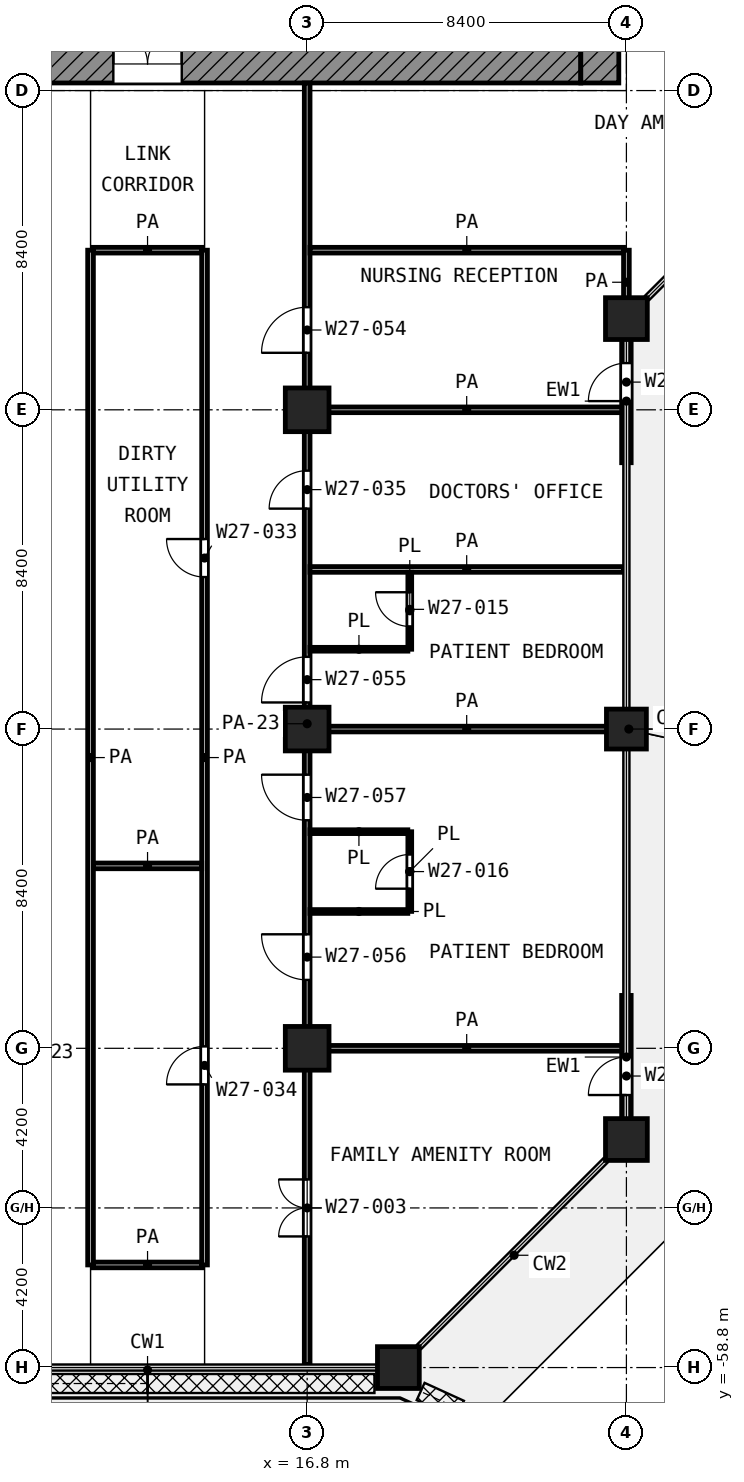
"""IFC4 building model, lengths in metres.
Left out: names, types, materials, properties, quantities, classifications, styles, units other than length and angle.
Written with IfcOpenShell. Run it as: python <this file> out.ifc"""

import sys

from ifc_helpers import new_model, si_unit, direction, frame, frame_2d, origin, origin_2d, place, context, subcontext, project, spatial, rectangle, extrude, element, fill, save


model = new_model("IFC4")
c1 = context("Model", 3, precision=1e-05, world=origin(), true_north=direction((0.0, 1.0)))
c2 = subcontext(c1, "Body", "Model", "MODEL_VIEW")
j1 = project(units=[si_unit("LENGTHUNIT", "METRE"), si_unit("PLANEANGLEUNIT", "RADIAN")], contexts=[c1])
p1 = place(None, origin())
s1 = spatial("IfcSite", under=j1, at=p1, CompositionType="ELEMENT")
p2 = place(p1, origin())
s2 = spatial("IfcBuilding", under=s1, at=p2, CompositionType="ELEMENT")
p3 = place(p2, frame((0.0, 0.0, 140.8)))
s3 = spatial("IfcBuildingStorey", under=s2, at=p3, CompositionType="ELEMENT", Elevation=140.8)
p4 = place(p3, frame((25.2, -31.2, 0.0), z_axis=(0.0, 0.0, 1.0), x_axis=(1.0, 0.0, 0.0)))
e1 = element("IfcColumn", 1, at=p4, inside=s3, PredefinedType="COLUMN", context=c2, shape_type="SweptSolid", body=[
    extrude(rectangle(XDim=1.1, YDim=1.1, at=origin_2d()), origin(), (0.0, 0.0, 1.0), 4.2),
])
for number, where, z_axis, x_axis in (
    (2, (16.8, -33.6, 0.0), (0.0, 0.0, 1.0), (1.0, 0.0, 0.0)),
    (3, (16.8, -42.0, 0.0), (0.0, 0.0, 1.0), (1.0, 0.0, 0.0)),
):
    element("IfcColumn", number, at=place(p3, frame(where, z_axis=z_axis, x_axis=x_axis)), inside=s3, PredefinedType="COLUMN", context=c2, shape_type="SweptSolid", body=[
        extrude(rectangle(XDim=1.15, YDim=1.15, at=origin_2d()), origin(), (0.0, 0.0, 1.0), 4.2),
    ])
p5 = place(p3, frame((25.2, -42.0, 0.0), z_axis=(0.0, 0.0, 1.0), x_axis=(1.0, 0.0, 0.0)))
e4 = element("IfcColumn", 4, at=p5, inside=s3, PredefinedType="COLUMN", context=c2, shape_type="SweptSolid", body=[
    extrude(rectangle(XDim=1.05, YDim=1.05, at=origin_2d()), origin(), (0.0, 0.0, 1.0), 4.2),
])
p6 = place(p3, frame((16.8, -50.4, 0.0), z_axis=(0.0, 0.0, 1.0), x_axis=(1.0, 0.0, 0.0)))
e5 = element("IfcColumn", 5, at=p6, inside=s3, PredefinedType="COLUMN", context=c2, shape_type="SweptSolid", body=[
    extrude(rectangle(XDim=1.15, YDim=1.15, at=origin_2d()), origin(), (0.0, 0.0, 1.0), 4.2),
])
for number, where, z_axis, x_axis in (
    (6, (25.2, -52.8, 0.0), (0.0, 0.0, 1.0), (1.0, 0.0, 0.0)),
    (7, (19.2, -58.8, 0.0), (0.0, 0.0, 1.0), (1.0, 0.0, 0.0)),
):
    element("IfcColumn", number, at=place(p3, frame(where, z_axis=z_axis, x_axis=x_axis)), inside=s3, PredefinedType="COLUMN", context=c2, shape_type="SweptSolid", body=[
        extrude(rectangle(XDim=1.1, YDim=1.1, at=origin_2d()), origin(), (0.0, 0.0, 1.0), 4.2),
    ])
p7 = place(p3, frame((25.2, -52.25, 0.0), z_axis=(0.0, 0.0, 1.0), x_axis=(0.0, 1.0, 0.0)))
e8 = element("IfcWall", 8, at=p7, inside=s3, PredefinedType="SOLIDWALL", context=c2, shape_type="SweptSolid", body=[
    extrude(rectangle(XDim=3.242, YDim=0.25, at=frame_2d((1.621, 0.0))), origin(), (0.0, 0.0, 1.0), 3.48),
])
p8 = place(p7, frame((0.621, 0.0, 0.0)))
e9 = element("IfcOpeningElement", 9, at=p8, cuts=e8, PredefinedType="OPENING", context=c2, shape_type="SweptSolid", body=[
    extrude(rectangle(XDim=1.0, YDim=2.1, at=frame_2d((0.5, 1.05))), frame((0.0, 0.135, 0.0), z_axis=(0.0, -1.0, 0.0), x_axis=(1.0, 0.0, 0.0)), (0.0, 0.0, 1.0), 0.27),
])
p9 = place(p3, frame((25.2, -34.992, 0.0), z_axis=(0.0, 0.0, 1.0), x_axis=(0.0, 1.0, 0.0)))
e10 = element("IfcWall", 10, at=p9, inside=s3, PredefinedType="SOLIDWALL", context=c2, shape_type="SweptSolid", body=[
    extrude(rectangle(XDim=3.242, YDim=0.25, at=frame_2d((1.621, 0.0))), origin(), (0.0, 0.0, 1.0), 3.48),
])
p10 = place(p9, frame((1.621, 0.0, 0.0)))
e11 = element("IfcOpeningElement", 11, at=p10, cuts=e10, PredefinedType="OPENING", context=c2, shape_type="SweptSolid", body=[
    extrude(rectangle(XDim=1.0, YDim=2.1, at=frame_2d((0.5, 1.05))), frame((0.0, 0.135, 0.0), z_axis=(0.0, -1.0, 0.0), x_axis=(1.0, 0.0, 0.0)), (0.0, 0.0, 1.0), 0.27),
])
p11 = place(p3, frame((5.4, -24.5, 0.0), z_axis=(0.0, 0.0, 1.0), x_axis=(1.0, 0.0, 0.0)))
e12 = element("IfcWall", 12, at=p11, inside=s3, PredefinedType="SHEAR", context=c2, shape_type="SweptSolid", body=[
    extrude(rectangle(XDim=18.6, YDim=1.0, at=frame_2d((9.3, 0.0))), origin(), (0.0, 0.0, 1.0), 3.6),
])
p12 = place(p11, frame((6.3, 0.0, 0.0)))
e13 = element("IfcOpeningElement", 13, at=p12, cuts=e12, PredefinedType="OPENING", context=c2, shape_type="SweptSolid", body=[
    extrude(rectangle(XDim=1.8, YDim=2.1, at=frame_2d((0.9, 1.05))), frame((0.0, 0.51, 0.0), z_axis=(0.0, -1.0, 0.0), x_axis=(1.0, 0.0, 0.0)), (0.0, 0.0, 1.0), 1.02),
])
p13 = place(p3, frame((24.5, -25.0, 0.0), z_axis=(0.0, 0.0, 1.0), x_axis=(0.0, 1.0, 0.0)))
e14 = element("IfcWall", 14, at=p13, inside=s3, PredefinedType="SHEAR", context=c2, shape_type="SweptSolid", body=[
    extrude(rectangle(XDim=1.0, YDim=1.0, at=frame_2d((0.5, 0.0))), origin(), (0.0, 0.0, 1.0), 3.6),
])
p14 = place(p3, frame((16.875, -46.8, 0.0), z_axis=(0.0, 0.0, 1.0), x_axis=(1.0, 0.0, 0.0)))
e15 = element("IfcWall", 15, at=p14, inside=s3, PredefinedType="PARTITIONING", context=c2, shape_type="SweptSolid", body=[
    extrude(rectangle(XDim=2.573, YDim=0.1, at=frame_2d((1.287, 0.0))), origin(), (0.0, 0.0, 1.0), 3.6),
])
p15 = place(p3, frame((16.875, -44.7, 0.0), z_axis=(0.0, 0.0, 1.0), x_axis=(1.0, 0.0, 0.0)))
e16 = element("IfcWall", 16, at=p15, inside=s3, PredefinedType="PARTITIONING", context=c2, shape_type="SweptSolid", body=[
    extrude(rectangle(XDim=2.574, YDim=0.1, at=frame_2d((1.287, 0.0))), origin(), (0.0, 0.0, 1.0), 3.6),
])
p16 = place(p3, frame((16.875, -39.9, 0.0), z_axis=(0.0, 0.0, 1.0), x_axis=(1.0, 0.0, 0.0)))
e17 = element("IfcWall", 17, at=p16, inside=s3, PredefinedType="PARTITIONING", context=c2, shape_type="SweptSolid", body=[
    extrude(rectangle(XDim=2.575, YDim=0.1, at=frame_2d((1.288, 0.0))), origin(), (0.0, 0.0, 1.0), 3.6),
])
p17 = place(p3, frame((19.5, -46.798, 0.0), z_axis=(0.0, 0.0, 1.0), x_axis=(0.0, 1.0, 0.0)))
e18 = element("IfcWall", 18, at=p17, inside=s3, PredefinedType="PARTITIONING", context=c2, shape_type="SweptSolid", body=[
    extrude(rectangle(XDim=2.096, YDim=0.1, at=frame_2d((1.048, 0.0))), origin(), (0.0, 0.0, 1.0), 3.6),
])
p18 = place(p17, frame((0.598, 0.0, 0.0)))
e19 = element("IfcOpeningElement", 19, at=p18, cuts=e18, PredefinedType="OPENING", context=c2, shape_type="SweptSolid", body=[
    extrude(rectangle(XDim=0.9, YDim=2.1, at=frame_2d((0.45, 1.05))), frame((0.0, 0.06, 0.0), z_axis=(0.0, -1.0, 0.0), x_axis=(1.0, 0.0, 0.0)), (0.0, 0.0, 1.0), 0.12),
])
p19 = place(p3, frame((19.5, -39.9, 0.0), z_axis=(0.0, 0.0, 1.0), x_axis=(0.0, 1.0, 0.0)))
e20 = element("IfcWall", 20, at=p19, inside=s3, PredefinedType="PARTITIONING", context=c2, shape_type="SweptSolid", body=[
    extrude(rectangle(XDim=2.025, YDim=0.1, at=frame_2d((1.012, 0.0))), origin(), (0.0, 0.0, 1.0), 3.6),
])
p20 = place(p19, frame((0.6, 0.0, 0.0)))
e21 = element("IfcOpeningElement", 21, at=p20, cuts=e20, PredefinedType="OPENING", context=c2, shape_type="SweptSolid", body=[
    extrude(rectangle(XDim=0.9, YDim=2.1, at=frame_2d((0.45, 1.05))), frame((0.0, 0.06, 0.0), z_axis=(0.0, -1.0, 0.0), x_axis=(1.0, 0.0, 0.0)), (0.0, 0.0, 1.0), 0.12),
])
p21 = place(p3, frame((11.175, -56.1, 0.0), z_axis=(0.0, 0.0, 1.0), x_axis=(1.0, 0.0, 0.0)))
e22 = element("IfcWall", 22, at=p21, inside=s3, PredefinedType="PARTITIONING", context=c2, shape_type="SweptSolid", body=[
    extrude(rectangle(XDim=2.85, YDim=0.15, at=frame_2d((1.425, 0.0))), origin(), (0.0, 0.0, 1.0), 3.6),
])
p22 = place(p3, frame((16.875, -50.4, 0.0), z_axis=(0.0, 0.0, 1.0), x_axis=(1.0, 0.0, 0.0)))
e23 = element("IfcWall", 23, at=p22, inside=s3, PredefinedType="PARTITIONING", context=c2, shape_type="SweptSolid", body=[
    extrude(rectangle(XDim=8.245, YDim=0.15, at=frame_2d((4.123, 0.0))), origin(), (0.0, 0.0, 1.0), 3.6),
])
p23 = place(p3, frame((11.175, -45.6, 0.0), z_axis=(0.0, 0.0, 1.0), x_axis=(1.0, 0.0, 0.0)))
e24 = element("IfcWall", 24, at=p23, inside=s3, PredefinedType="PARTITIONING", context=c2, shape_type="SweptSolid", body=[
    extrude(rectangle(XDim=2.85, YDim=0.15, at=frame_2d((1.425, 0.0))), origin(), (0.0, 0.0, 1.0), 3.6),
])
for number, where, z_axis, x_axis in (
    (25, (16.875, -42.0, 0.0), (0.0, 0.0, 1.0), (1.0, 0.0, 0.0)),
    (26, (16.875, -37.8, 0.0), (0.0, 0.0, 1.0), (1.0, 0.0, 0.0)),
    (27, (16.875, -33.6, 0.0), (0.0, 0.0, 1.0), (1.0, 0.0, 0.0)),
):
    element("IfcWall", number, at=place(p3, frame(where, z_axis=z_axis, x_axis=x_axis)), inside=s3, PredefinedType="PARTITIONING", context=c2, shape_type="SweptSolid", body=[
        extrude(rectangle(XDim=8.245, YDim=0.15, at=frame_2d((4.123, 0.0))), origin(), (0.0, 0.0, 1.0), 3.6),
    ])
p24 = place(p3, frame((11.175, -29.4, 0.0), z_axis=(0.0, 0.0, 1.0), x_axis=(1.0, 0.0, 0.0)))
e28 = element("IfcWall", 28, at=p24, inside=s3, PredefinedType="PARTITIONING", context=c2, shape_type="SweptSolid", body=[
    extrude(rectangle(XDim=2.85, YDim=0.15, at=frame_2d((1.425, 0.0))), origin(), (0.0, 0.0, 1.0), 3.6),
])
p25 = place(p3, frame((16.875, -29.4, 0.0), z_axis=(0.0, 0.0, 1.0), x_axis=(1.0, 0.0, 0.0)))
e29 = element("IfcWall", 29, at=p25, inside=s3, PredefinedType="PARTITIONING", context=c2, shape_type="SweptSolid", body=[
    extrude(rectangle(XDim=8.25, YDim=0.15, at=frame_2d((4.125, 0.0))), origin(), (0.0, 0.0, 1.0), 3.6),
])
p26 = place(p3, frame((11.1, -56.1, 0.0), z_axis=(0.0, 0.0, 1.0), x_axis=(0.0, 1.0, 0.0)))
e30 = element("IfcWall", 30, at=p26, inside=s3, PredefinedType="PARTITIONING", context=c2, shape_type="SweptSolid", body=[
    extrude(rectangle(XDim=26.7, YDim=0.15, at=frame_2d((13.35, 0.0))), origin(), (0.0, 0.0, 1.0), 3.6),
])
p27 = place(p3, frame((14.1, -56.1, 0.0), z_axis=(0.0, 0.0, 1.0), x_axis=(0.0, 1.0, 0.0)))
e31 = element("IfcWall", 31, at=p27, inside=s3, PredefinedType="PARTITIONING", context=c2, shape_type="SweptSolid", body=[
    extrude(rectangle(XDim=26.7, YDim=0.15, at=frame_2d((13.35, 0.0))), origin(), (0.0, 0.0, 1.0), 3.6),
])
p28 = place(p27, frame((18.1, 0.0, 0.0)))
e32 = element("IfcOpeningElement", 32, at=p28, cuts=e31, PredefinedType="OPENING", context=c2, shape_type="SweptSolid", body=[
    extrude(rectangle(XDim=1.0, YDim=2.1, at=frame_2d((0.5, 1.05))), frame((0.0, 0.085, 0.0), z_axis=(0.0, -1.0, 0.0), x_axis=(1.0, 0.0, 0.0)), (0.0, 0.0, 1.0), 0.17),
])
p29 = place(p27, frame((4.75, 0.0, 0.0)))
e33 = element("IfcOpeningElement", 33, at=p29, cuts=e31, PredefinedType="OPENING", context=c2, shape_type="SweptSolid", body=[
    extrude(rectangle(XDim=1.0, YDim=2.1, at=frame_2d((0.5, 1.05))), frame((0.0, 0.085, 0.0), z_axis=(0.0, -1.0, 0.0), x_axis=(1.0, 0.0, 0.0)), (0.0, 0.0, 1.0), 0.17),
])
p30 = place(p3, frame((16.8, -58.72, 0.0), z_axis=(0.0, 0.0, 1.0), x_axis=(0.0, 1.0, 0.0)))
e34 = element("IfcWall", 34, at=p30, inside=s3, PredefinedType="PARTITIONING", context=c2, shape_type="SweptSolid", body=[
    extrude(rectangle(XDim=33.72, YDim=0.15, at=frame_2d((16.86, 0.0))), origin(), (0.0, 0.0, 1.0), 2.7),
])
p31 = place(p30, frame((26.62, 0.0, 0.0)))
e35 = element("IfcOpeningElement", 35, at=p31, cuts=e34, PredefinedType="OPENING", context=c2, shape_type="SweptSolid", body=[
    extrude(rectangle(XDim=1.2, YDim=2.1, at=frame_2d((0.6, 1.05))), frame((0.0, 0.085, 0.0), z_axis=(0.0, -1.0, 0.0), x_axis=(1.0, 0.0, 0.0)), (0.0, 0.0, 1.0), 0.17),
])
p32 = place(p30, frame((22.52, 0.0, 0.0)))
e36 = element("IfcOpeningElement", 36, at=p32, cuts=e34, PredefinedType="OPENING", context=c2, shape_type="SweptSolid", body=[
    extrude(rectangle(XDim=1.0, YDim=2.1, at=frame_2d((0.5, 1.05))), frame((0.0, 0.085, 0.0), z_axis=(0.0, -1.0, 0.0), x_axis=(1.0, 0.0, 0.0)), (0.0, 0.0, 1.0), 0.17),
])
p33 = place(p30, frame((17.42, 0.0, 0.0)))
e37 = element("IfcOpeningElement", 37, at=p33, cuts=e34, PredefinedType="OPENING", context=c2, shape_type="SweptSolid", body=[
    extrude(rectangle(XDim=1.2, YDim=2.1, at=frame_2d((0.6, 1.05))), frame((0.0, 0.085, 0.0), z_axis=(0.0, -1.0, 0.0), x_axis=(1.0, 0.0, 0.0)), (0.0, 0.0, 1.0), 0.17),
])
p34 = place(p30, frame((10.12, 0.0, 0.0)))
e38 = element("IfcOpeningElement", 38, at=p34, cuts=e34, PredefinedType="OPENING", context=c2, shape_type="SweptSolid", body=[
    extrude(rectangle(XDim=1.2, YDim=2.1, at=frame_2d((0.6, 1.05))), frame((0.0, 0.085, 0.0), z_axis=(0.0, -1.0, 0.0), x_axis=(1.0, 0.0, 0.0)), (0.0, 0.0, 1.0), 0.17),
])
p35 = place(p30, frame((14.32, 0.0, 0.0)))
e39 = element("IfcOpeningElement", 39, at=p35, cuts=e34, PredefinedType="OPENING", context=c2, shape_type="SweptSolid", body=[
    extrude(rectangle(XDim=1.2, YDim=2.1, at=frame_2d((0.6, 1.05))), frame((0.0, 0.085, 0.0), z_axis=(0.0, -1.0, 0.0), x_axis=(1.0, 0.0, 0.0)), (0.0, 0.0, 1.0), 0.17),
])
p36 = place(p30, frame((3.37, 0.0, 0.0)))
e40 = element("IfcOpeningElement", 40, at=p36, cuts=e34, PredefinedType="OPENING", context=c2, shape_type="SweptSolid", body=[
    extrude(rectangle(XDim=1.5, YDim=2.1, at=frame_2d((0.75, 1.05))), frame((0.0, 0.085, 0.0), z_axis=(0.0, -1.0, 0.0), x_axis=(1.0, 0.0, 0.0)), (0.0, 0.0, 1.0), 0.17),
])
p37 = place(p3, frame((25.2, -31.087, 0.0), z_axis=(0.0, 0.0, 1.0), x_axis=(0.0, 1.0, 0.0)))
e41 = element("IfcWall", 41, at=p37, inside=s3, PredefinedType="PARTITIONING", context=c2, shape_type="SweptSolid", body=[
    extrude(rectangle(XDim=1.687, YDim=0.15, at=frame_2d((0.844, 0.0))), origin(), (0.0, 0.0, 1.0), 3.6),
])
p38 = place(p8, origin())
e42 = element("IfcDoor", 42, at=p38, inside=s3, OperationType="SINGLE_SWING_LEFT", PredefinedType="DOOR", context=c2, shape_type="SweptSolid", body=[
    extrude(rectangle(XDim=1.0, YDim=2.1, at=frame_2d((0.5, 1.05))), frame((0.0, 0.025, 0.0), z_axis=(0.0, -1.0, 0.0), x_axis=(1.0, 0.0, 0.0)), (0.0, 0.0, 1.0), 0.05),
])
fill(e9, e42)
p39 = place(p10, origin())
e43 = element("IfcDoor", 43, at=p39, inside=s3, OperationType="SINGLE_SWING_LEFT", PredefinedType="DOOR", context=c2, shape_type="SweptSolid", body=[
    extrude(rectangle(XDim=1.0, YDim=2.1, at=frame_2d((0.5, 1.05))), frame((0.0, 0.025, 0.0), z_axis=(0.0, -1.0, 0.0), x_axis=(1.0, 0.0, 0.0)), (0.0, 0.0, 1.0), 0.05),
])
fill(e11, e43)
p40 = place(p12, origin())
e44 = element("IfcDoor", 44, at=p40, inside=s3, OperationType="DOUBLE_DOOR_SINGLE_SWING", PredefinedType="DOOR", context=c2, shape_type="SweptSolid", body=[
    extrude(rectangle(XDim=1.8, YDim=2.1, at=frame_2d((0.9, 1.05))), frame((0.0, 0.025, 0.0), z_axis=(0.0, -1.0, 0.0), x_axis=(1.0, 0.0, 0.0)), (0.0, 0.0, 1.0), 0.05),
])
fill(e13, e44)
p41 = place(p28, origin())
e45 = element("IfcDoor", 45, at=p41, inside=s3, OperationType="SINGLE_SWING_RIGHT", PredefinedType="DOOR", context=c2, shape_type="SweptSolid", body=[
    extrude(rectangle(XDim=1.0, YDim=2.1, at=frame_2d((0.5, 1.05))), frame((0.0, 0.025, 0.0), z_axis=(0.0, -1.0, 0.0), x_axis=(1.0, 0.0, 0.0)), (0.0, 0.0, 1.0), 0.05),
])
fill(e32, e45)
p42 = place(p29, origin())
e46 = element("IfcDoor", 46, at=p42, inside=s3, OperationType="SINGLE_SWING_LEFT", PredefinedType="DOOR", context=c2, shape_type="SweptSolid", body=[
    extrude(rectangle(XDim=1.0, YDim=2.1, at=frame_2d((0.5, 1.05))), frame((0.0, 0.025, 0.0), z_axis=(0.0, -1.0, 0.0), x_axis=(1.0, 0.0, 0.0)), (0.0, 0.0, 1.0), 0.05),
])
fill(e33, e46)
p43 = place(p31, origin())
e47 = element("IfcDoor", 47, at=p43, inside=s3, OperationType="SINGLE_SWING_LEFT", PredefinedType="DOOR", context=c2, shape_type="SweptSolid", body=[
    extrude(rectangle(XDim=1.2, YDim=2.1, at=frame_2d((0.6, 1.05))), frame((0.0, 0.025, 0.0), z_axis=(0.0, -1.0, 0.0), x_axis=(1.0, 0.0, 0.0)), (0.0, 0.0, 1.0), 0.05),
])
fill(e35, e47)
p44 = place(p32, origin())
e48 = element("IfcDoor", 48, at=p44, inside=s3, OperationType="SINGLE_SWING_LEFT", PredefinedType="DOOR", context=c2, shape_type="SweptSolid", body=[
    extrude(rectangle(XDim=1.0, YDim=2.1, at=frame_2d((0.5, 1.05))), frame((0.0, 0.025, 0.0), z_axis=(0.0, -1.0, 0.0), x_axis=(1.0, 0.0, 0.0)), (0.0, 0.0, 1.0), 0.05),
])
fill(e36, e48)
p45 = place(p33, origin())
e49 = element("IfcDoor", 49, at=p45, inside=s3, OperationType="SINGLE_SWING_LEFT", PredefinedType="DOOR", context=c2, shape_type="SweptSolid", body=[
    extrude(rectangle(XDim=1.2, YDim=2.1, at=frame_2d((0.6, 1.05))), frame((0.0, 0.025, 0.0), z_axis=(0.0, -1.0, 0.0), x_axis=(1.0, 0.0, 0.0)), (0.0, 0.0, 1.0), 0.05),
])
fill(e37, e49)
p46 = place(p20, origin())
e50 = element("IfcDoor", 50, at=p46, inside=s3, OperationType="SINGLE_SWING_RIGHT", PredefinedType="DOOR", context=c2, shape_type="SweptSolid", body=[
    extrude(rectangle(XDim=0.9, YDim=2.1, at=frame_2d((0.45, 1.05))), frame((0.0, 0.025, 0.0), z_axis=(0.0, -1.0, 0.0), x_axis=(1.0, 0.0, 0.0)), (0.0, 0.0, 1.0), 0.05),
])
fill(e21, e50)
p47 = place(p34, origin())
e51 = element("IfcDoor", 51, at=p47, inside=s3, OperationType="SINGLE_SWING_RIGHT", PredefinedType="DOOR", context=c2, shape_type="SweptSolid", body=[
    extrude(rectangle(XDim=1.2, YDim=2.1, at=frame_2d((0.6, 1.05))), frame((0.0, 0.025, 0.0), z_axis=(0.0, -1.0, 0.0), x_axis=(1.0, 0.0, 0.0)), (0.0, 0.0, 1.0), 0.05),
])
fill(e38, e51)
p48 = place(p35, origin())
e52 = element("IfcDoor", 52, at=p48, inside=s3, OperationType="SINGLE_SWING_RIGHT", PredefinedType="DOOR", context=c2, shape_type="SweptSolid", body=[
    extrude(rectangle(XDim=1.2, YDim=2.1, at=frame_2d((0.6, 1.05))), frame((0.0, 0.025, 0.0), z_axis=(0.0, -1.0, 0.0), x_axis=(1.0, 0.0, 0.0)), (0.0, 0.0, 1.0), 0.05),
])
fill(e39, e52)
p49 = place(p18, origin())
e53 = element("IfcDoor", 53, at=p49, inside=s3, OperationType="SINGLE_SWING_LEFT", PredefinedType="DOOR", context=c2, shape_type="SweptSolid", body=[
    extrude(rectangle(XDim=0.9, YDim=2.1, at=frame_2d((0.45, 1.05))), frame((0.0, 0.025, 0.0), z_axis=(0.0, -1.0, 0.0), x_axis=(1.0, 0.0, 0.0)), (0.0, 0.0, 1.0), 0.05),
])
fill(e19, e53)
p50 = place(p36, origin())
e54 = element("IfcDoor", 54, at=p50, inside=s3, OperationType="DOUBLE_DOOR_SINGLE_SWING", PredefinedType="DOOR", context=c2, shape_type="SweptSolid", body=[
    extrude(rectangle(XDim=1.5, YDim=2.1, at=frame_2d((0.75, 1.05))), frame((0.0, 0.025, 0.0), z_axis=(0.0, -1.0, 0.0), x_axis=(1.0, 0.0, 0.0)), (0.0, 0.0, 1.0), 0.05),
])
fill(e40, e54)
save(model, sys.argv[1])
